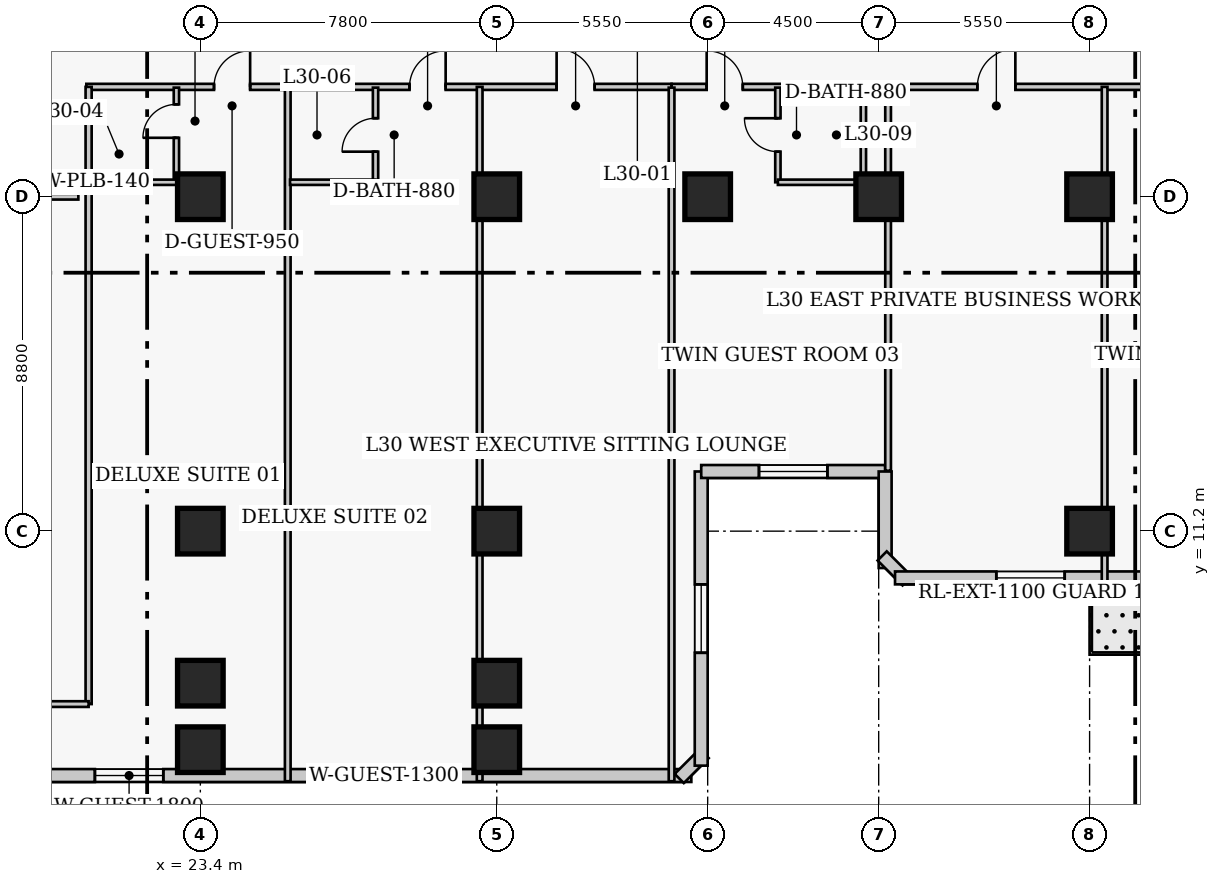
"""IFC4 building model, lengths in metres.
Left out: names, types, materials, properties, quantities, classifications, styles, units other than length and angle.
Written with IfcOpenShell. Run it as: python <this file> out.ifc"""

import sys

from ifc_helpers import new_model, si_unit, direction, frame, frame_2d, origin, origin_2d, place, context, subcontext, project, spatial, rectangle, extrude, element, fill, save


model = new_model("IFC4")
c1 = context("Model", 3, precision=1e-05, world=origin(), true_north=direction((0.0, 1.0)))
c2 = subcontext(c1, "Body", "Model", "MODEL_VIEW")
j1 = project(units=[si_unit("LENGTHUNIT", "METRE"), si_unit("PLANEANGLEUNIT", "RADIAN")], contexts=[c1])
p1 = place(None, origin())
s1 = spatial("IfcSite", under=j1, at=p1, CompositionType="ELEMENT")
p2 = place(p1, origin())
s2 = spatial("IfcBuilding", under=s1, at=p2, CompositionType="ELEMENT")
p3 = place(p2, frame((0.0, 0.0, 122.2)))
s3 = spatial("IfcBuildingStorey", under=s2, at=p3, CompositionType="ELEMENT", Elevation=122.2)
for number, where, z_axis, x_axis in (
    (1, (23.4, 11.2, 0.0), (0.0, 0.0, 1.0), (1.0, 0.0, 0.0)),
    (2, (23.4, 20.0, 0.0), (0.0, 0.0, 1.0), (1.0, 0.0, 0.0)),
    (3, (31.2, 11.2, 0.0), (0.0, 0.0, 1.0), (1.0, 0.0, 0.0)),
    (4, (31.2, 20.0, 0.0), (0.0, 0.0, 1.0), (1.0, 0.0, 0.0)),
    (5, (36.75, 20.0, 0.0), (0.0, 0.0, 1.0), (1.0, 0.0, 0.0)),
    (6, (41.25, 20.0, 0.0), (0.0, 0.0, 1.0), (1.0, 0.0, 0.0)),
    (7, (46.8, 11.2, 0.0), (0.0, 0.0, 1.0), (1.0, 0.0, 0.0)),
    (8, (46.8, 20.0, 0.0), (0.0, 0.0, 1.0), (1.0, 0.0, 0.0)),
    (9, (23.4, 7.2, 0.0), (0.0, 0.0, 1.0), (1.0, 0.0, 0.0)),
    (10, (31.2, 7.2, 0.0), (0.0, 0.0, 1.0), (1.0, 0.0, 0.0)),
    (11, (23.4, 5.45, 0.0), (0.0, 0.0, 1.0), (1.0, 0.0, 0.0)),
    (12, (31.2, 5.45, 0.0), (0.0, 0.0, 1.0), (1.0, 0.0, 0.0)),
):
    element("IfcColumn", number, at=place(p3, frame(where, z_axis=z_axis, x_axis=x_axis)), inside=s3, PredefinedType="COLUMN", context=c2, shape_type="SweptSolid", body=[
        extrude(rectangle(XDim=1.2, YDim=1.2, at=origin_2d()), origin(), (0.0, 0.0, 1.0), 3.8),
    ])
p4 = place(p3, frame((8.03, 4.77, 0.0), z_axis=(0.0, 0.0, 1.0), x_axis=(1.0, 0.0, 0.0)))
e13 = element("IfcWall", 13, at=p4, inside=s3, PredefinedType="SOLIDWALL", context=c2, shape_type="SweptSolid", body=[
    extrude(rectangle(XDim=28.29, YDim=0.34, at=frame_2d((14.145, 0.0))), origin(), (0.0, 0.0, 1.0), 3.54),
])
p5 = place(p4, frame((12.595, 0.0, 0.85)))
e14 = element("IfcOpeningElement", 14, at=p5, cuts=e13, PredefinedType="OPENING", context=c2, shape_type="SweptSolid", body=[
    extrude(rectangle(XDim=1.8, YDim=1.8, at=frame_2d((0.9, 0.9))), frame((0.0, 0.18, 0.0), z_axis=(0.0, -1.0, 0.0), x_axis=(1.0, 0.0, 0.0)), (0.0, 0.0, 1.0), 0.36),
])
p6 = place(p4, frame((19.555, 0.0, 0.85)))
e15 = element("IfcOpeningElement", 15, at=p6, cuts=e13, PredefinedType="OPENING", context=c2, shape_type="SweptSolid", body=[
    extrude(rectangle(XDim=1.3, YDim=1.7, at=frame_2d((0.65, 0.85))), frame((0.0, 0.18, 0.0), z_axis=(0.0, -1.0, 0.0), x_axis=(1.0, 0.0, 0.0)), (0.0, 0.0, 1.0), 0.36),
])
p7 = place(p3, frame((36.001, 4.692, 0.0), z_axis=(0.0, 0.0, 1.0), x_axis=(0.707238225886, 0.706975312048, 0.0)))
e16 = element("IfcWall", 16, at=p7, inside=s3, PredefinedType="SOLIDWALL", context=c2, shape_type="SweptSolid", body=[
    extrude(rectangle(XDim=0.929, YDim=0.34, at=frame_2d((0.464, 0.0))), origin(), (0.0, 0.0, 1.0), 3.54),
])
p8 = place(p3, frame((36.58, 5.03, 0.0), z_axis=(0.0, 0.0, 1.0), x_axis=(0.0, 1.0, 0.0)))
e17 = element("IfcWall", 17, at=p8, inside=s3, PredefinedType="SOLIDWALL", context=c2, shape_type="SweptSolid", body=[
    extrude(rectangle(XDim=7.74, YDim=0.34, at=frame_2d((3.87, 0.0))), origin(), (0.0, 0.0, 1.0), 3.54),
])
p9 = place(p8, frame((2.97, 0.0, 0.85)))
e18 = element("IfcOpeningElement", 18, at=p9, cuts=e17, PredefinedType="OPENING", context=c2, shape_type="SweptSolid", body=[
    extrude(rectangle(XDim=1.8, YDim=1.8, at=frame_2d((0.9, 0.9))), frame((0.0, 0.18, 0.0), z_axis=(0.0, -1.0, 0.0), x_axis=(1.0, 0.0, 0.0)), (0.0, 0.0, 1.0), 0.36),
])
p10 = place(p3, frame((36.58, 12.77, 0.0), z_axis=(0.0, 0.0, 1.0), x_axis=(1.0, 0.0, 0.0)))
e19 = element("IfcWall", 19, at=p10, inside=s3, PredefinedType="SOLIDWALL", context=c2, shape_type="SweptSolid", body=[
    extrude(rectangle(XDim=4.84, YDim=0.34, at=frame_2d((2.42, 0.0))), origin(), (0.0, 0.0, 1.0), 3.54),
])
p11 = place(p10, frame((1.52, 0.0, 0.85)))
e20 = element("IfcOpeningElement", 20, at=p11, cuts=e19, PredefinedType="OPENING", context=c2, shape_type="SweptSolid", body=[
    extrude(rectangle(XDim=1.8, YDim=1.8, at=frame_2d((0.9, 0.9))), frame((0.0, 0.18, 0.0), z_axis=(0.0, -1.0, 0.0), x_axis=(1.0, 0.0, 0.0)), (0.0, 0.0, 1.0), 0.36),
])
p12 = place(p3, frame((41.42, 12.77, 0.0), z_axis=(0.0, 0.0, 1.0), x_axis=(0.0, -1.0, 0.0)))
e21 = element("IfcWall", 21, at=p12, inside=s3, PredefinedType="SOLIDWALL", context=c2, shape_type="SweptSolid", body=[
    extrude(rectangle(XDim=2.54, YDim=0.34, at=frame_2d((1.27, 0.0))), origin(), (0.0, 0.0, 1.0), 3.54),
])
p13 = place(p3, frame((41.342, 10.549, 0.0), z_axis=(0.0, 0.0, 1.0), x_axis=(0.707106781187, -0.707106781187, 0.0)))
e22 = element("IfcWall", 22, at=p13, inside=s3, PredefinedType="SOLIDWALL", context=c2, shape_type="SweptSolid", body=[
    extrude(rectangle(XDim=0.929, YDim=0.34, at=frame_2d((0.464, 0.0))), origin(), (0.0, 0.0, 1.0), 3.54),
])
p14 = place(p3, frame((41.68, 9.97, 0.0), z_axis=(0.0, 0.0, 1.0), x_axis=(1.0, 0.0, 0.0)))
e23 = element("IfcWall", 23, at=p14, inside=s3, PredefinedType="SOLIDWALL", context=c2, shape_type="SweptSolid", body=[
    extrude(rectangle(XDim=28.29, YDim=0.34, at=frame_2d((14.145, 0.0))), origin(), (0.0, 0.0, 1.0), 3.54),
])
p15 = place(p14, frame((8.32, 0.0, 0.0)))
e24 = element("IfcOpeningElement", 24, at=p15, cuts=e23, PredefinedType="OPENING", context=c2, shape_type="SweptSolid", body=[
    extrude(rectangle(XDim=1.4, YDim=2.15, at=frame_2d((0.7, 1.075))), frame((0.0, 0.18, 0.0), z_axis=(0.0, -1.0, 0.0), x_axis=(1.0, 0.0, 0.0)), (0.0, 0.0, 1.0), 0.36),
])
p16 = place(p14, frame((2.665, 0.0, 0.85)))
e25 = element("IfcOpeningElement", 25, at=p16, cuts=e23, PredefinedType="OPENING", context=c2, shape_type="SweptSolid", body=[
    extrude(rectangle(XDim=1.8, YDim=1.8, at=frame_2d((0.9, 0.9))), frame((0.0, 0.18, 0.0), z_axis=(0.0, -1.0, 0.0), x_axis=(1.0, 0.0, 0.0)), (0.0, 0.0, 1.0), 0.36),
])
p17 = place(p14, frame((13.895, 0.0, 0.85)))
e26 = element("IfcOpeningElement", 26, at=p17, cuts=e23, PredefinedType="OPENING", context=c2, shape_type="SweptSolid", body=[
    extrude(rectangle(XDim=1.8, YDim=1.8, at=frame_2d((0.9, 0.9))), frame((0.0, 0.18, 0.0), z_axis=(0.0, -1.0, 0.0), x_axis=(1.0, 0.0, 0.0)), (0.0, 0.0, 1.0), 0.36),
])
p18 = place(p3, frame((20.4, 22.89, 0.0), z_axis=(0.0, 0.0, 1.0), x_axis=(1.0, 0.0, 0.0)))
e27 = element("IfcWall", 27, at=p18, inside=s3, PredefinedType="PARTITIONING", context=c2, shape_type="SweptSolid", body=[
    extrude(rectangle(XDim=15.4, YDim=0.16, at=frame_2d((7.7, 0.0))), origin(), (0.0, 0.0, 1.0), 3.54),
])
p19 = place(p18, frame((3.36, 0.0, 0.0)))
e28 = element("IfcOpeningElement", 28, at=p19, cuts=e27, PredefinedType="OPENING", context=c2, shape_type="SweptSolid", body=[
    extrude(rectangle(XDim=0.95, YDim=2.1, at=frame_2d((0.475, 1.05))), frame((0.0, 0.09, 0.0), z_axis=(0.0, -1.0, 0.0), x_axis=(1.0, 0.0, 0.0)), (0.0, 0.0, 1.0), 0.18),
])
p20 = place(p18, frame((8.505, 0.0, 0.0)))
e29 = element("IfcOpeningElement", 29, at=p20, cuts=e27, PredefinedType="OPENING", context=c2, shape_type="SweptSolid", body=[
    extrude(rectangle(XDim=0.95, YDim=2.1, at=frame_2d((0.475, 1.05))), frame((0.0, 0.09, 0.0), z_axis=(0.0, -1.0, 0.0), x_axis=(1.0, 0.0, 0.0)), (0.0, 0.0, 1.0), 0.18),
])
p21 = place(p18, frame((12.375, 0.0, 0.0)))
e30 = element("IfcOpeningElement", 30, at=p21, cuts=e27, PredefinedType="OPENING", context=c2, shape_type="SweptSolid", body=[
    extrude(rectangle(XDim=1.0, YDim=2.15, at=frame_2d((0.5, 1.075))), frame((0.0, 0.09, 0.0), z_axis=(0.0, -1.0, 0.0), x_axis=(1.0, 0.0, 0.0)), (0.0, 0.0, 1.0), 0.18),
])
p22 = place(p3, frame((35.8, 22.89, 0.0), z_axis=(0.0, 0.0, 1.0), x_axis=(1.0, 0.0, 0.0)))
e31 = element("IfcWall", 31, at=p22, inside=s3, PredefinedType="PARTITIONING", context=c2, shape_type="SweptSolid", body=[
    extrude(rectangle(XDim=22.85, YDim=0.16, at=frame_2d((11.425, 0.0))), origin(), (0.0, 0.0, 1.0), 3.54),
])
p23 = place(p22, frame((0.924, 0.0, 0.0)))
e32 = element("IfcOpeningElement", 32, at=p23, cuts=e31, PredefinedType="OPENING", context=c2, shape_type="SweptSolid", body=[
    extrude(rectangle(XDim=0.95, YDim=2.1, at=frame_2d((0.475, 1.05))), frame((0.0, 0.09, 0.0), z_axis=(0.0, -1.0, 0.0), x_axis=(1.0, 0.0, 0.0)), (0.0, 0.0, 1.0), 0.18),
])
p24 = place(p22, frame((8.046, 0.0, 0.0)))
e33 = element("IfcOpeningElement", 33, at=p24, cuts=e31, PredefinedType="OPENING", context=c2, shape_type="SweptSolid", body=[
    extrude(rectangle(XDim=1.0, YDim=2.15, at=frame_2d((0.5, 1.075))), frame((0.0, 0.09, 0.0), z_axis=(0.0, -1.0, 0.0), x_axis=(1.0, 0.0, 0.0)), (0.0, 0.0, 1.0), 0.18),
])
p25 = place(p22, frame((12.614, 0.0, 0.0)))
e34 = element("IfcOpeningElement", 34, at=p25, cuts=e31, PredefinedType="OPENING", context=c2, shape_type="SweptSolid", body=[
    extrude(rectangle(XDim=0.95, YDim=2.1, at=frame_2d((0.475, 1.05))), frame((0.0, 0.09, 0.0), z_axis=(0.0, -1.0, 0.0), x_axis=(1.0, 0.0, 0.0)), (0.0, 0.0, 1.0), 0.18),
])
p26 = place(p22, frame((18.311, 0.0, 0.0)))
e35 = element("IfcOpeningElement", 35, at=p26, cuts=e31, PredefinedType="OPENING", context=c2, shape_type="SweptSolid", body=[
    extrude(rectangle(XDim=0.95, YDim=2.1, at=frame_2d((0.475, 1.05))), frame((0.0, 0.09, 0.0), z_axis=(0.0, -1.0, 0.0), x_axis=(1.0, 0.0, 0.0)), (0.0, 0.0, 1.0), 0.18),
])
p27 = place(p3, frame((20.46, 6.65, 0.0), z_axis=(0.0, 0.0, 1.0), x_axis=(0.0, 1.0, 0.0)))
e36 = element("IfcWall", 36, at=p27, inside=s3, PredefinedType="PARTITIONING", context=c2, shape_type="SweptSolid", body=[
    extrude(rectangle(XDim=16.24, YDim=0.16, at=frame_2d((8.12, 0.0))), origin(), (0.0, 0.0, 1.0), 3.54),
])
p28 = place(p3, frame((18.24, 6.65, 0.0), z_axis=(0.0, 0.0, 1.0), x_axis=(1.0, 0.0, 0.0)))
e37 = element("IfcWall", 37, at=p28, inside=s3, PredefinedType="PARTITIONING", context=c2, shape_type="SweptSolid", body=[
    extrude(rectangle(XDim=2.22, YDim=0.15, at=frame_2d((1.11, 0.0))), origin(), (0.0, 0.0, 1.0), 3.54),
])
p29 = place(p3, frame((22.77, 20.38, 0.0), z_axis=(0.0, 0.0, 1.0), x_axis=(0.0, 1.0, 0.0)))
e38 = element("IfcWall", 38, at=p29, inside=s3, PredefinedType="PLUMBINGWALL", context=c2, shape_type="SweptSolid", body=[
    extrude(rectangle(XDim=2.49, YDim=0.14, at=frame_2d((1.245, 0.0))), origin(), (0.0, 0.0, 1.0), 3.54),
])
p30 = place(p29, frame((1.17, 0.0, 0.0)))
e39 = element("IfcOpeningElement", 39, at=p30, cuts=e38, PredefinedType="OPENING", context=c2, shape_type="SweptSolid", body=[
    extrude(rectangle(XDim=0.88, YDim=2.05, at=frame_2d((0.44, 1.025))), frame((0.0, 0.08, 0.0), z_axis=(0.0, -1.0, 0.0), x_axis=(1.0, 0.0, 0.0)), (0.0, 0.0, 1.0), 0.16),
])
p31 = place(p3, frame((20.52, 20.38, 0.0), z_axis=(0.0, 0.0, 1.0), x_axis=(1.0, 0.0, 0.0)))
e40 = element("IfcWall", 40, at=p31, inside=s3, PredefinedType="PLUMBINGWALL", context=c2, shape_type="SweptSolid", body=[
    extrude(rectangle(XDim=2.25, YDim=0.14, at=frame_2d((1.125, 0.0))), origin(), (0.0, 0.0, 1.0), 3.54),
])
p32 = place(p3, frame((25.7, 4.62, 0.0), z_axis=(0.0, 0.0, 1.0), x_axis=(0.0, 1.0, 0.0)))
e41 = element("IfcWall", 41, at=p32, inside=s3, PredefinedType="PARTITIONING", context=c2, shape_type="SweptSolid", body=[
    extrude(rectangle(XDim=18.27, YDim=0.15, at=frame_2d((9.135, 0.0))), origin(), (0.0, 0.0, 1.0), 3.54),
])
p33 = place(p3, frame((28.01, 20.38, 0.0), z_axis=(0.0, 0.0, 1.0), x_axis=(0.0, 1.0, 0.0)))
e42 = element("IfcWall", 42, at=p33, inside=s3, PredefinedType="PLUMBINGWALL", context=c2, shape_type="SweptSolid", body=[
    extrude(rectangle(XDim=2.49, YDim=0.14, at=frame_2d((1.245, 0.0))), origin(), (0.0, 0.0, 1.0), 3.54),
])
p34 = place(p33, frame((0.805, 0.0, 0.0)))
e43 = element("IfcOpeningElement", 43, at=p34, cuts=e42, PredefinedType="OPENING", context=c2, shape_type="SweptSolid", body=[
    extrude(rectangle(XDim=0.88, YDim=2.05, at=frame_2d((0.44, 1.025))), frame((0.0, 0.08, 0.0), z_axis=(0.0, -1.0, 0.0), x_axis=(1.0, 0.0, 0.0)), (0.0, 0.0, 1.0), 0.16),
])
p35 = place(p3, frame((25.76, 20.38, 0.0), z_axis=(0.0, 0.0, 1.0), x_axis=(1.0, 0.0, 0.0)))
e44 = element("IfcWall", 44, at=p35, inside=s3, PredefinedType="PLUMBINGWALL", context=c2, shape_type="SweptSolid", body=[
    extrude(rectangle(XDim=2.25, YDim=0.14, at=frame_2d((1.125, 0.0))), origin(), (0.0, 0.0, 1.0), 3.54),
])
p36 = place(p3, frame((30.75, 4.62, 0.0), z_axis=(0.0, 0.0, 1.0), x_axis=(0.0, 1.0, 0.0)))
e45 = element("IfcWall", 45, at=p36, inside=s3, PredefinedType="PARTITIONING", context=c2, shape_type="SweptSolid", body=[
    extrude(rectangle(XDim=18.27, YDim=0.15, at=frame_2d((9.135, 0.0))), origin(), (0.0, 0.0, 1.0), 3.54),
])
p37 = place(p3, frame((35.8, 4.62, 0.0), z_axis=(0.0, 0.0, 1.0), x_axis=(0.0, 1.0, 0.0)))
e46 = element("IfcWall", 46, at=p37, inside=s3, PredefinedType="PARTITIONING", context=c2, shape_type="SweptSolid", body=[
    extrude(rectangle(XDim=18.25, YDim=0.15, at=frame_2d((9.125, 0.0))), origin(), (0.0, 0.0, 1.0), 3.54),
])
p38 = place(p3, frame((38.597, 20.38, 0.0), z_axis=(0.0, 0.0, 1.0), x_axis=(0.0, 1.0, 0.0)))
e47 = element("IfcWall", 47, at=p38, inside=s3, PredefinedType="PLUMBINGWALL", context=c2, shape_type="SweptSolid", body=[
    extrude(rectangle(XDim=2.49, YDim=0.14, at=frame_2d((1.245, 0.0))), origin(), (0.0, 0.0, 1.0), 3.54),
])
p39 = place(p38, frame((0.805, 0.0, 0.0)))
e48 = element("IfcOpeningElement", 48, at=p39, cuts=e47, PredefinedType="OPENING", context=c2, shape_type="SweptSolid", body=[
    extrude(rectangle(XDim=0.88, YDim=2.05, at=frame_2d((0.44, 1.025))), frame((0.0, 0.08, 0.0), z_axis=(0.0, -1.0, 0.0), x_axis=(1.0, 0.0, 0.0)), (0.0, 0.0, 1.0), 0.16),
])
p40 = place(p3, frame((40.847, 20.38, 0.0), z_axis=(0.0, 0.0, 1.0), x_axis=(0.0, 1.0, 0.0)))
e49 = element("IfcWall", 49, at=p40, inside=s3, PredefinedType="PLUMBINGWALL", context=c2, shape_type="SweptSolid", body=[
    extrude(rectangle(XDim=2.49, YDim=0.14, at=frame_2d((1.245, 0.0))), origin(), (0.0, 0.0, 1.0), 3.54),
])
p41 = place(p3, frame((38.597, 20.38, 0.0), z_axis=(0.0, 0.0, 1.0), x_axis=(1.0, 0.0, 0.0)))
e50 = element("IfcWall", 50, at=p41, inside=s3, PredefinedType="PLUMBINGWALL", context=c2, shape_type="SweptSolid", body=[
    extrude(rectangle(XDim=2.25, YDim=0.14, at=frame_2d((1.125, 0.0))), origin(), (0.0, 0.0, 1.0), 3.54),
])
p42 = place(p3, frame((41.498, 12.79, 0.0), z_axis=(0.0, 0.0, 1.0), x_axis=(0.0, 1.0, 0.0)))
e51 = element("IfcWall", 51, at=p42, inside=s3, PredefinedType="PARTITIONING", context=c2, shape_type="SweptSolid", body=[
    extrude(rectangle(XDim=10.1, YDim=0.15, at=frame_2d((5.05, 0.0))), origin(), (0.0, 0.0, 1.0), 3.54),
])
p43 = place(p3, frame((47.195, 9.82, 0.0), z_axis=(0.0, 0.0, 1.0), x_axis=(0.0, 1.0, 0.0)))
e52 = element("IfcWall", 52, at=p43, inside=s3, PredefinedType="PARTITIONING", context=c2, shape_type="SweptSolid", body=[
    extrude(rectangle(XDim=13.07, YDim=0.15, at=frame_2d((6.535, 0.0))), origin(), (0.0, 0.0, 1.0), 3.54),
])
p44 = place(p3, frame((4.02, 20.0, 0.0), z_axis=(0.0, 0.0, 1.0), x_axis=(1.0, 0.0, 0.0)))
e53 = element("IfcWall", 53, at=p44, inside=s3, PredefinedType="PARTITIONING", context=c2, shape_type="SweptSolid", body=[
    extrude(rectangle(XDim=16.17, YDim=0.15, at=frame_2d((8.085, 0.0))), origin(), (0.0, 0.0, 1.0), 2.679),
])
p45 = place(p5, origin())
e54 = element("IfcWindow", 54, at=p45, inside=s3, PartitioningType="SINGLE_PANEL", PredefinedType="WINDOW", context=c2, shape_type="SweptSolid", body=[
    extrude(rectangle(XDim=1.8, YDim=1.8, at=frame_2d((0.9, 0.9))), frame((0.0, 0.03, 0.0), z_axis=(0.0, -1.0, 0.0), x_axis=(1.0, 0.0, 0.0)), (0.0, 0.0, 1.0), 0.06),
])
fill(e14, e54)
p46 = place(p9, origin())
e55 = element("IfcWindow", 55, at=p46, inside=s3, PartitioningType="SINGLE_PANEL", PredefinedType="WINDOW", context=c2, shape_type="SweptSolid", body=[
    extrude(rectangle(XDim=1.8, YDim=1.8, at=frame_2d((0.9, 0.9))), frame((0.0, 0.03, 0.0), z_axis=(0.0, -1.0, 0.0), x_axis=(1.0, 0.0, 0.0)), (0.0, 0.0, 1.0), 0.06),
])
fill(e18, e55)
p47 = place(p11, origin())
e56 = element("IfcWindow", 56, at=p47, inside=s3, PartitioningType="SINGLE_PANEL", PredefinedType="WINDOW", context=c2, shape_type="SweptSolid", body=[
    extrude(rectangle(XDim=1.8, YDim=1.8, at=frame_2d((0.9, 0.9))), frame((0.0, 0.03, 0.0), z_axis=(0.0, -1.0, 0.0), x_axis=(1.0, 0.0, 0.0)), (0.0, 0.0, 1.0), 0.06),
])
fill(e20, e56)
p48 = place(p16, origin())
e57 = element("IfcWindow", 57, at=p48, inside=s3, PartitioningType="SINGLE_PANEL", PredefinedType="WINDOW", context=c2, shape_type="SweptSolid", body=[
    extrude(rectangle(XDim=1.8, YDim=1.8, at=frame_2d((0.9, 0.9))), frame((0.0, 0.03, 0.0), z_axis=(0.0, -1.0, 0.0), x_axis=(1.0, 0.0, 0.0)), (0.0, 0.0, 1.0), 0.06),
])
fill(e25, e57)
p49 = place(p6, origin())
e58 = element("IfcWindow", 58, at=p49, inside=s3, PartitioningType="SINGLE_PANEL", PredefinedType="WINDOW", context=c2, shape_type="SweptSolid", body=[
    extrude(rectangle(XDim=1.3, YDim=1.7, at=frame_2d((0.65, 0.85))), frame((0.0, 0.03, 0.0), z_axis=(0.0, -1.0, 0.0), x_axis=(1.0, 0.0, 0.0)), (0.0, 0.0, 1.0), 0.06),
])
fill(e15, e58)
p50 = place(p30, origin())
e59 = element("IfcDoor", 59, at=p50, inside=s3, OperationType="SINGLE_SWING_LEFT", PredefinedType="DOOR", context=c2, shape_type="SweptSolid", body=[
    extrude(rectangle(XDim=0.88, YDim=2.05, at=frame_2d((0.44, 1.025))), frame((0.0, 0.025, 0.0), z_axis=(0.0, -1.0, 0.0), x_axis=(1.0, 0.0, 0.0)), (0.0, 0.0, 1.0), 0.05),
])
fill(e39, e59)
p51 = place(p19, origin())
e60 = element("IfcDoor", 60, at=p51, inside=s3, OperationType="SINGLE_SWING_RIGHT", PredefinedType="DOOR", context=c2, shape_type="SweptSolid", body=[
    extrude(rectangle(XDim=0.95, YDim=2.1, at=frame_2d((0.475, 1.05))), frame((0.0, 0.025, 0.0), z_axis=(0.0, -1.0, 0.0), x_axis=(1.0, 0.0, 0.0)), (0.0, 0.0, 1.0), 0.05),
])
fill(e28, e60)
p52 = place(p34, origin())
e61 = element("IfcDoor", 61, at=p52, inside=s3, OperationType="SINGLE_SWING_LEFT", PredefinedType="DOOR", context=c2, shape_type="SweptSolid", body=[
    extrude(rectangle(XDim=0.88, YDim=2.05, at=frame_2d((0.44, 1.025))), frame((0.0, 0.025, 0.0), z_axis=(0.0, -1.0, 0.0), x_axis=(1.0, 0.0, 0.0)), (0.0, 0.0, 1.0), 0.05),
])
fill(e43, e61)
p53 = place(p20, origin())
e62 = element("IfcDoor", 62, at=p53, inside=s3, OperationType="SINGLE_SWING_RIGHT", PredefinedType="DOOR", context=c2, shape_type="SweptSolid", body=[
    extrude(rectangle(XDim=0.95, YDim=2.1, at=frame_2d((0.475, 1.05))), frame((0.0, 0.025, 0.0), z_axis=(0.0, -1.0, 0.0), x_axis=(1.0, 0.0, 0.0)), (0.0, 0.0, 1.0), 0.05),
])
fill(e29, e62)
p54 = place(p21, origin())
e63 = element("IfcDoor", 63, at=p54, inside=s3, OperationType="SINGLE_SWING_LEFT", PredefinedType="DOOR", context=c2, shape_type="SweptSolid", body=[
    extrude(rectangle(XDim=1.0, YDim=2.15, at=frame_2d((0.5, 1.075))), frame((0.0, 0.025, 0.0), z_axis=(0.0, -1.0, 0.0), x_axis=(1.0, 0.0, 0.0)), (0.0, 0.0, 1.0), 0.05),
])
fill(e30, e63)
p55 = place(p39, origin())
e64 = element("IfcDoor", 64, at=p55, inside=s3, OperationType="SINGLE_SWING_RIGHT", PredefinedType="DOOR", context=c2, shape_type="SweptSolid", body=[
    extrude(rectangle(XDim=0.88, YDim=2.05, at=frame_2d((0.44, 1.025))), frame((0.0, 0.025, 0.0), z_axis=(0.0, -1.0, 0.0), x_axis=(1.0, 0.0, 0.0)), (0.0, 0.0, 1.0), 0.05),
])
fill(e48, e64)
p56 = place(p23, origin())
e65 = element("IfcDoor", 65, at=p56, inside=s3, OperationType="SINGLE_SWING_LEFT", PredefinedType="DOOR", context=c2, shape_type="SweptSolid", body=[
    extrude(rectangle(XDim=0.95, YDim=2.1, at=frame_2d((0.475, 1.05))), frame((0.0, 0.025, 0.0), z_axis=(0.0, -1.0, 0.0), x_axis=(1.0, 0.0, 0.0)), (0.0, 0.0, 1.0), 0.05),
])
fill(e32, e65)
p57 = place(p24, origin())
e66 = element("IfcDoor", 66, at=p57, inside=s3, OperationType="SINGLE_SWING_RIGHT", PredefinedType="DOOR", context=c2, shape_type="SweptSolid", body=[
    extrude(rectangle(XDim=1.0, YDim=2.15, at=frame_2d((0.5, 1.075))), frame((0.0, 0.025, 0.0), z_axis=(0.0, -1.0, 0.0), x_axis=(1.0, 0.0, 0.0)), (0.0, 0.0, 1.0), 0.05),
])
fill(e33, e66)
save(model, sys.argv[1])
